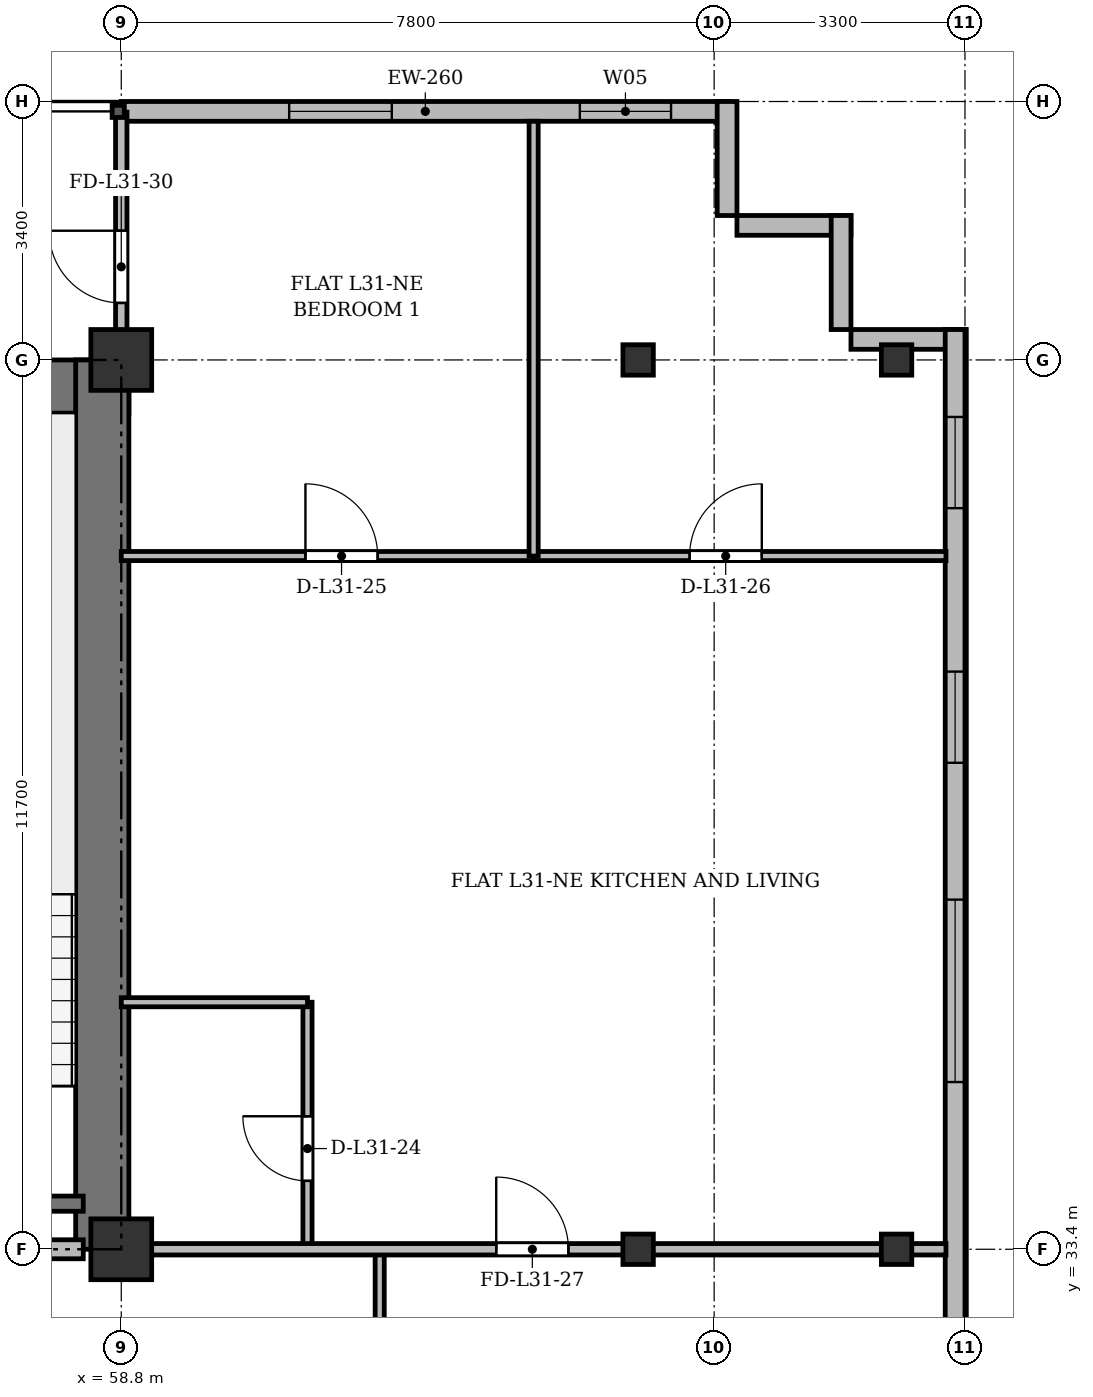
"""IFC4 building model, lengths in metres.
Left out: names, types, materials, properties, quantities, classifications, styles, units other than length and angle.
Written with IfcOpenShell. Run it as: python <this file> out.ifc"""

import sys

from ifc_helpers import new_model, si_unit, direction, frame, frame_2d, origin, origin_2d, place, context, subcontext, project, spatial, rectangle, i_section, extrude, source, transform, mapped, element, fill, save


model = new_model("IFC4")
c1 = context("Model", 3, precision=1e-05, world=origin(), true_north=direction((0.0, 1.0)))
c2 = subcontext(c1, "Body", "Model", "MODEL_VIEW")
j1 = project(units=[si_unit("LENGTHUNIT", "METRE"), si_unit("PLANEANGLEUNIT", "RADIAN")], contexts=[c1])
p1 = place(None, origin())
s1 = spatial("IfcSite", under=j1, at=p1, CompositionType="ELEMENT")
p2 = place(p1, origin())
s2 = spatial("IfcBuilding", under=s1, at=p2, CompositionType="ELEMENT")
p3 = place(p2, frame((0.0, 0.0, 121.3)))
s3 = spatial("IfcBuildingStorey", under=s2, at=p3, CompositionType="ELEMENT", Elevation=121.3)
m1 = source(origin(), c2, "Body", "SweptSolid", [
    extrude(rectangle(XDim=0.8, YDim=0.8, at=origin_2d()), origin(), (0.0, 0.0, 1.0), 3.6),
])
for number, where, z_axis, x_axis in (
    (1, (58.8, 33.4, 0.0), (0.0, 0.0, 1.0), (1.0, 0.0, 0.0)),
    (2, (58.8, 45.1, 0.0), (0.0, 0.0, 1.0), (1.0, 0.0, 0.0)),
):
    element("IfcColumn", number, at=place(p3, frame(where, z_axis=z_axis, x_axis=x_axis)), inside=s3, PredefinedType="COLUMN", context=c2, shape_type="MappedRepresentation", body=[
        mapped(m1, transform((0.0, 0.0, 0.0), x_axis=(1.0, 0.0, 0.0), y_axis=(0.0, 1.0, 0.0), z_axis=(0.0, 0.0, 1.0), scale=1.0)),
    ])
m2 = source(origin(), c2, "Body", "SweptSolid", [
    extrude(i_section(OverallWidth=0.4, OverallDepth=0.4, WebThickness=0.022, FlangeThickness=0.035, at=origin_2d()), origin(), (0.0, 0.0, 1.0), 3.6),
])
for number, where, z_axis, x_axis in (
    (3, (65.6, 33.4, 0.0), (0.0, 0.0, 1.0), (1.0, 0.0, 0.0)),
    (4, (65.6, 45.1, 0.0), (0.0, 0.0, 1.0), (1.0, 0.0, 0.0)),
    (5, (69.0, 33.4, 0.0), (0.0, 0.0, 1.0), (1.0, 0.0, 0.0)),
    (6, (69.0, 45.1, 0.0), (0.0, 0.0, 1.0), (1.0, 0.0, 0.0)),
):
    element("IfcColumn", number, at=place(p3, frame(where, z_axis=z_axis, x_axis=x_axis)), inside=s3, PredefinedType="COLUMN", context=c2, shape_type="MappedRepresentation", body=[
        mapped(m2, transform((0.0, 0.0, 0.0), x_axis=(1.0, 0.0, 0.0), y_axis=(0.0, 1.0, 0.0), z_axis=(0.0, 0.0, 1.0), scale=1.0)),
    ])
p4 = place(p3, frame((58.8, 48.37, 0.0), z_axis=(0.0, 0.0, 1.0), x_axis=(1.0, 0.0, 0.0)))
e7 = element("IfcWall", 7, at=p4, inside=s3, PredefinedType="SOLIDWALL", context=c2, shape_type="SweptSolid", body=[
    extrude(rectangle(XDim=8.0, YDim=0.26, at=frame_2d((4.0, 0.0))), origin(), (0.0, 0.0, 1.0), 3.34),
])
p5 = place(p4, frame((2.209, 0.0, 0.9)))
e8 = element("IfcOpeningElement", 8, at=p5, cuts=e7, PredefinedType="OPENING", context=c2, shape_type="SweptSolid", body=[
    extrude(rectangle(XDim=1.35, YDim=1.5, at=frame_2d((0.675, 0.75))), frame((0.0, 0.14, 0.0), z_axis=(0.0, -1.0, 0.0), x_axis=(1.0, 0.0, 0.0)), (0.0, 0.0, 1.0), 0.28),
])
p6 = place(p4, frame((6.033, 0.0, 0.9)))
e9 = element("IfcOpeningElement", 9, at=p6, cuts=e7, PredefinedType="OPENING", context=c2, shape_type="SweptSolid", body=[
    extrude(rectangle(XDim=1.2, YDim=1.65, at=frame_2d((0.6, 0.825))), frame((0.0, 0.14, 0.0), z_axis=(0.0, -1.0, 0.0), x_axis=(1.0, 0.0, 0.0)), (0.0, 0.0, 1.0), 0.28),
])
for number, where, z_axis, x_axis in (
    (10, (66.77, 48.5, 0.0), (0.0, 0.0, 1.0), (0.0, -1.0, 0.0)),
    (11, (66.9, 46.87, 0.0), (0.0, 0.0, 1.0), (1.0, 0.0, 0.0)),
    (12, (68.27, 47.0, 0.0), (0.0, 0.0, 1.0), (0.0, -1.0, 0.0)),
):
    element("IfcWall", number, at=place(p3, frame(where, z_axis=z_axis, x_axis=x_axis)), inside=s3, PredefinedType="SOLIDWALL", context=c2, shape_type="SweptSolid", body=[
        extrude(rectangle(XDim=1.5, YDim=0.26, at=frame_2d((0.75, 0.0))), origin(), (0.0, 0.0, 1.0), 3.34),
    ])
p7 = place(p3, frame((68.4, 45.37, 0.0), z_axis=(0.0, 0.0, 1.0), x_axis=(1.0, 0.0, 0.0)))
e13 = element("IfcWall", 13, at=p7, inside=s3, PredefinedType="SOLIDWALL", context=c2, shape_type="SweptSolid", body=[
    extrude(rectangle(XDim=1.5, YDim=0.26, at=frame_2d((0.75, 0.0))), origin(), (0.0, 0.0, 1.0), 2.752),
])
p8 = place(p3, frame((69.77, 45.5, 0.0), z_axis=(0.0, 0.0, 1.0), x_axis=(0.0, -1.0, 0.0)))
e14 = element("IfcWall", 14, at=p8, inside=s3, PredefinedType="SOLIDWALL", context=c2, shape_type="SweptSolid", body=[
    extrude(rectangle(XDim=39.6, YDim=0.26, at=frame_2d((19.8, 0.0))), origin(), (0.0, 0.0, 1.0), 3.34),
])
p9 = place(p8, frame((36.95, 0.0, 0.92)))
e15 = element("IfcOpeningElement", 15, at=p9, cuts=e14, PredefinedType="OPENING", context=c2, shape_type="SweptSolid", body=[
    extrude(rectangle(XDim=1.2, YDim=1.65, at=frame_2d((0.6, 0.825))), frame((0.0, 0.14, 0.0), z_axis=(0.0, -1.0, 0.0), x_axis=(1.0, 0.0, 0.0)), (0.0, 0.0, 1.0), 0.28),
])
p10 = place(p8, frame((32.9, 0.0, 0.92)))
e16 = element("IfcOpeningElement", 16, at=p10, cuts=e14, PredefinedType="OPENING", context=c2, shape_type="SweptSolid", body=[
    extrude(rectangle(XDim=2.4, YDim=2.1, at=frame_2d((1.2, 1.05))), frame((0.0, 0.14, 0.0), z_axis=(0.0, -1.0, 0.0), x_axis=(1.0, 0.0, 0.0)), (0.0, 0.0, 1.0), 0.28),
])
p11 = place(p8, frame((28.7, 0.0, 0.92)))
e17 = element("IfcOpeningElement", 17, at=p11, cuts=e14, PredefinedType="OPENING", context=c2, shape_type="SweptSolid", body=[
    extrude(rectangle(XDim=2.4, YDim=2.1, at=frame_2d((1.2, 1.05))), frame((0.0, 0.14, 0.0), z_axis=(0.0, -1.0, 0.0), x_axis=(1.0, 0.0, 0.0)), (0.0, 0.0, 1.0), 0.28),
])
p12 = place(p8, frame((21.5, 0.0, 0.92)))
e18 = element("IfcOpeningElement", 18, at=p12, cuts=e14, PredefinedType="OPENING", context=c2, shape_type="SweptSolid", body=[
    extrude(rectangle(XDim=2.4, YDim=2.1, at=frame_2d((1.2, 1.05))), frame((0.0, 0.14, 0.0), z_axis=(0.0, -1.0, 0.0), x_axis=(1.0, 0.0, 0.0)), (0.0, 0.0, 1.0), 0.28),
])
p13 = place(p8, frame((7.5, 0.0, 0.92)))
e19 = element("IfcOpeningElement", 19, at=p13, cuts=e14, PredefinedType="OPENING", context=c2, shape_type="SweptSolid", body=[
    extrude(rectangle(XDim=2.4, YDim=2.1, at=frame_2d((1.2, 1.05))), frame((0.0, 0.14, 0.0), z_axis=(0.0, -1.0, 0.0), x_axis=(1.0, 0.0, 0.0)), (0.0, 0.0, 1.0), 0.28),
])
p14 = place(p8, frame((4.5, 0.0, 0.92)))
e20 = element("IfcOpeningElement", 20, at=p14, cuts=e14, PredefinedType="OPENING", context=c2, shape_type="SweptSolid", body=[
    extrude(rectangle(XDim=1.2, YDim=1.65, at=frame_2d((0.6, 0.825))), frame((0.0, 0.14, 0.0), z_axis=(0.0, -1.0, 0.0), x_axis=(1.0, 0.0, 0.0)), (0.0, 0.0, 1.0), 0.28),
])
p15 = place(p8, frame((1.15, 0.0, 0.92)))
e21 = element("IfcOpeningElement", 21, at=p15, cuts=e14, PredefinedType="OPENING", context=c2, shape_type="SweptSolid", body=[
    extrude(rectangle(XDim=1.2, YDim=1.65, at=frame_2d((0.6, 0.825))), frame((0.0, 0.14, 0.0), z_axis=(0.0, -1.0, 0.0), x_axis=(1.0, 0.0, 0.0)), (0.0, 0.0, 1.0), 0.28),
])
p16 = place(p3, frame((15.5, 44.75, 0.0), z_axis=(0.0, 0.0, 1.0), x_axis=(1.0, 0.0, 0.0)))
e22 = element("IfcWall", 22, at=p16, inside=s3, PredefinedType="SHEAR", context=c2, shape_type="SweptSolid", body=[
    extrude(rectangle(XDim=43.4, YDim=0.7, at=frame_2d((21.7, 0.0))), origin(), (0.0, 0.0, 1.0), 3.34),
])
p17 = place(p3, frame((58.55, 33.4, 0.0), z_axis=(0.0, 0.0, 1.0), x_axis=(0.0, 1.0, 0.0)))
e23 = element("IfcWall", 23, at=p17, inside=s3, PredefinedType="SHEAR", context=c2, shape_type="SweptSolid", body=[
    extrude(rectangle(XDim=11.7, YDim=0.7, at=frame_2d((5.85, 0.0))), origin(), (0.0, 0.0, 1.0), 3.34),
])
p18 = place(p3, frame((54.9, 34.0, 0.0), z_axis=(0.0, 0.0, 1.0), x_axis=(1.0, 0.0, 0.0)))
e24 = element("IfcWall", 24, at=p18, inside=s3, PredefinedType="SHEAR", context=c2, shape_type="SweptSolid", body=[
    extrude(rectangle(XDim=3.4, YDim=0.2, at=frame_2d((1.7, 0.0))), origin(), (0.0, 0.0, 1.0), 3.34),
])
p19 = place(p3, frame((47.15, 33.4, 0.0), z_axis=(0.0, 0.0, 1.0), x_axis=(1.0, 0.0, 0.0)))
e25 = element("IfcWall", 25, at=p19, inside=s3, PredefinedType="PARTITIONING", context=c2, shape_type="SweptSolid", body=[
    extrude(rectangle(XDim=11.15, YDim=0.25, at=frame_2d((5.575, 0.0))), origin(), (0.0, 0.0, 1.0), 2.752),
])
p20 = place(p19, frame((0.7, 0.0, 0.0)))
e26 = element("IfcOpeningElement", 26, at=p20, cuts=e25, PredefinedType="OPENING", context=c2, shape_type="SweptSolid", body=[
    extrude(rectangle(XDim=0.95, YDim=2.15, at=frame_2d((0.475, 1.075))), frame((0.0, 0.135, 0.0), z_axis=(0.0, -1.0, 0.0), x_axis=(1.0, 0.0, 0.0)), (0.0, 0.0, 1.0), 0.27),
])
p21 = place(p19, frame((6.0, 0.0, 0.0)))
e27 = element("IfcOpeningElement", 27, at=p21, cuts=e25, PredefinedType="OPENING", context=c2, shape_type="SweptSolid", body=[
    extrude(rectangle(XDim=1.2, YDim=2.15, at=frame_2d((0.6, 1.075))), frame((0.0, 0.135, 0.0), z_axis=(0.0, -1.0, 0.0), x_axis=(1.0, 0.0, 0.0)), (0.0, 0.0, 1.0), 0.27),
])
p22 = place(p3, frame((62.2, 29.8, 0.0), z_axis=(0.0, 0.0, 1.0), x_axis=(0.0, 1.0, 0.0)))
e28 = element("IfcWall", 28, at=p22, inside=s3, PredefinedType="PARTITIONING", context=c2, shape_type="SweptSolid", body=[
    extrude(rectangle(XDim=3.6, YDim=0.12, at=frame_2d((1.8, 0.0))), origin(), (0.0, 0.0, 1.0), 2.752),
])
p23 = place(p3, frame((61.25, 33.4, 0.0), z_axis=(0.0, 0.0, 1.0), x_axis=(0.0, 1.0, 0.0)))
e29 = element("IfcWall", 29, at=p23, inside=s3, PredefinedType="PARTITIONING", context=c2, shape_type="SweptSolid", body=[
    extrude(rectangle(XDim=3.25, YDim=0.12, at=frame_2d((1.625, 0.0))), origin(), (0.0, 0.0, 1.0), 2.752),
])
p24 = place(p23, frame((0.9, 0.0, 0.0)))
e30 = element("IfcOpeningElement", 30, at=p24, cuts=e29, PredefinedType="OPENING", context=c2, shape_type="SweptSolid", body=[
    extrude(rectangle(XDim=0.85, YDim=2.1, at=frame_2d((0.425, 1.05))), frame((0.0, 0.07, 0.0), z_axis=(0.0, -1.0, 0.0), x_axis=(1.0, 0.0, 0.0)), (0.0, 0.0, 1.0), 0.14),
])
p25 = place(p3, frame((58.8, 36.65, 0.0), z_axis=(0.0, 0.0, 1.0), x_axis=(1.0, 0.0, 0.0)))
e31 = element("IfcWall", 31, at=p25, inside=s3, PredefinedType="PARTITIONING", context=c2, shape_type="SweptSolid", body=[
    extrude(rectangle(XDim=2.45, YDim=0.12, at=frame_2d((1.225, 0.0))), origin(), (0.0, 0.0, 1.0), 2.84),
])
p26 = place(p3, frame((58.8, 42.52, 0.0), z_axis=(0.0, 0.0, 1.0), x_axis=(1.0, 0.0, 0.0)))
e32 = element("IfcWall", 32, at=p26, inside=s3, PredefinedType="PARTITIONING", context=c2, shape_type="SweptSolid", body=[
    extrude(rectangle(XDim=5.425, YDim=0.12, at=frame_2d((2.712, 0.0))), origin(), (0.0, 0.0, 1.0), 2.84),
])
p27 = place(p26, frame((2.423, 0.0, 0.0)))
e33 = element("IfcOpeningElement", 33, at=p27, cuts=e32, PredefinedType="OPENING", context=c2, shape_type="SweptSolid", body=[
    extrude(rectangle(XDim=0.95, YDim=2.15, at=frame_2d((0.475, 1.075))), frame((0.0, 0.07, 0.0), z_axis=(0.0, -1.0, 0.0), x_axis=(1.0, 0.0, 0.0)), (0.0, 0.0, 1.0), 0.14),
])
p28 = place(p3, frame((64.225, 42.52, 0.0), z_axis=(0.0, 0.0, 1.0), x_axis=(1.0, 0.0, 0.0)))
e34 = element("IfcWall", 34, at=p28, inside=s3, PredefinedType="PARTITIONING", context=c2, shape_type="SweptSolid", body=[
    extrude(rectangle(XDim=5.425, YDim=0.12, at=frame_2d((2.712, 0.0))), origin(), (0.0, 0.0, 1.0), 2.84),
])
p29 = place(p28, frame((2.052, 0.0, 0.0)))
e35 = element("IfcOpeningElement", 35, at=p29, cuts=e34, PredefinedType="OPENING", context=c2, shape_type="SweptSolid", body=[
    extrude(rectangle(XDim=0.95, YDim=2.15, at=frame_2d((0.475, 1.075))), frame((0.0, 0.07, 0.0), z_axis=(0.0, -1.0, 0.0), x_axis=(1.0, 0.0, 0.0)), (0.0, 0.0, 1.0), 0.14),
])
p30 = place(p3, frame((64.225, 42.52, 0.0), z_axis=(0.0, 0.0, 1.0), x_axis=(0.0, 1.0, 0.0)))
e36 = element("IfcWall", 36, at=p30, inside=s3, PredefinedType="PARTITIONING", context=c2, shape_type="SweptSolid", body=[
    extrude(rectangle(XDim=5.72, YDim=0.12, at=frame_2d((2.86, 0.0))), origin(), (0.0, 0.0, 1.0), 2.752),
])
p31 = place(p3, frame((58.8, 33.4, 0.0), z_axis=(0.0, 0.0, 1.0), x_axis=(1.0, 0.0, 0.0)))
e37 = element("IfcWall", 37, at=p31, inside=s3, PredefinedType="PARTITIONING", context=c2, shape_type="SweptSolid", body=[
    extrude(rectangle(XDim=10.85, YDim=0.15, at=frame_2d((5.425, 0.0))), origin(), (0.0, 0.0, 1.0), 2.752),
])
p32 = place(p31, frame((4.933, 0.0, 0.0)))
e38 = element("IfcOpeningElement", 38, at=p32, cuts=e37, PredefinedType="OPENING", context=c2, shape_type="SweptSolid", body=[
    extrude(rectangle(XDim=0.95, YDim=2.15, at=frame_2d((0.475, 1.075))), frame((0.0, 0.085, 0.0), z_axis=(0.0, -1.0, 0.0), x_axis=(1.0, 0.0, 0.0)), (0.0, 0.0, 1.0), 0.17),
])
p33 = place(p3, frame((58.8, 44.75, 0.0), z_axis=(0.0, 0.0, 1.0), x_axis=(0.0, 1.0, 0.0)))
e39 = element("IfcWall", 39, at=p33, inside=s3, PredefinedType="PARTITIONING", context=c2, shape_type="SweptSolid", body=[
    extrude(rectangle(XDim=3.61, YDim=0.15, at=frame_2d((1.805, 0.0))), origin(), (0.0, 0.0, 1.0), 2.84),
])
p34 = place(p33, frame((1.1, 0.0, 0.0)))
e40 = element("IfcOpeningElement", 40, at=p34, cuts=e39, PredefinedType="OPENING", context=c2, shape_type="SweptSolid", body=[
    extrude(rectangle(XDim=0.95, YDim=2.15, at=frame_2d((0.475, 1.075))), frame((0.0, 0.085, 0.0), z_axis=(0.0, -1.0, 0.0), x_axis=(1.0, 0.0, 0.0)), (0.0, 0.0, 1.0), 0.17),
])
m3 = source(origin(), c2, "Body", "SweptSolid", [
    extrude(rectangle(XDim=1.35, YDim=1.5, at=frame_2d((0.675, 0.75))), frame((0.0, 0.03, 0.0), z_axis=(0.0, -1.0, 0.0), x_axis=(1.0, 0.0, 0.0)), (0.0, 0.0, 1.0), 0.06),
])
p35 = place(p5, origin())
e41 = element("IfcWindow", 41, at=p35, inside=s3, PartitioningType="SINGLE_PANEL", PredefinedType="WINDOW", context=c2, shape_type="MappedRepresentation", body=[
    mapped(m3, transform((0.0, 0.0, 0.0), x_axis=(1.0, 0.0, 0.0), y_axis=(0.0, 1.0, 0.0), z_axis=(0.0, 0.0, 1.0), scale=1.0)),
])
fill(e8, e41)
m4 = source(origin(), c2, "Body", "SweptSolid", [
    extrude(rectangle(XDim=1.2, YDim=1.65, at=frame_2d((0.6, 0.825))), frame((0.0, 0.03, 0.0), z_axis=(0.0, -1.0, 0.0), x_axis=(1.0, 0.0, 0.0)), (0.0, 0.0, 1.0), 0.06),
])
p36 = place(p6, origin())
e42 = element("IfcWindow", 42, at=p36, inside=s3, PartitioningType="SINGLE_PANEL", PredefinedType="WINDOW", context=c2, shape_type="MappedRepresentation", body=[
    mapped(m4, transform((0.0, 0.0, 0.0), x_axis=(1.0, 0.0, 0.0), y_axis=(0.0, 1.0, 0.0), z_axis=(0.0, 0.0, 1.0), scale=1.0)),
])
fill(e9, e42)
m5 = source(origin(), c2, "Body", "SweptSolid", [
    extrude(rectangle(XDim=2.4, YDim=2.1, at=frame_2d((1.2, 1.05))), frame((0.0, 0.03, 0.0), z_axis=(0.0, -1.0, 0.0), x_axis=(1.0, 0.0, 0.0)), (0.0, 0.0, 1.0), 0.06),
])
p37 = place(p13, origin())
e43 = element("IfcWindow", 43, at=p37, inside=s3, PartitioningType="SINGLE_PANEL", PredefinedType="WINDOW", context=c2, shape_type="MappedRepresentation", body=[
    mapped(m5, transform((0.0, 0.0, 0.0), x_axis=(1.0, 0.0, 0.0), y_axis=(0.0, 1.0, 0.0), z_axis=(0.0, 0.0, 1.0), scale=1.0)),
])
fill(e19, e43)
p38 = place(p14, origin())
e44 = element("IfcWindow", 44, at=p38, inside=s3, PartitioningType="SINGLE_PANEL", PredefinedType="WINDOW", context=c2, shape_type="MappedRepresentation", body=[
    mapped(m4, transform((0.0, 0.0, 0.0), x_axis=(1.0, 0.0, 0.0), y_axis=(0.0, 1.0, 0.0), z_axis=(0.0, 0.0, 1.0), scale=1.0)),
])
fill(e20, e44)
p39 = place(p15, origin())
e45 = element("IfcWindow", 45, at=p39, inside=s3, PartitioningType="SINGLE_PANEL", PredefinedType="WINDOW", context=c2, shape_type="MappedRepresentation", body=[
    mapped(m4, transform((0.0, 0.0, 0.0), x_axis=(1.0, 0.0, 0.0), y_axis=(0.0, 1.0, 0.0), z_axis=(0.0, 0.0, 1.0), scale=1.0)),
])
fill(e21, e45)
m6 = source(origin(), c2, "Body", "SweptSolid", [
    extrude(rectangle(XDim=0.85, YDim=2.1, at=frame_2d((0.425, 1.05))), frame((0.0, 0.025, 0.0), z_axis=(0.0, -1.0, 0.0), x_axis=(1.0, 0.0, 0.0)), (0.0, 0.0, 1.0), 0.05),
])
p40 = place(p24, origin())
e46 = element("IfcDoor", 46, at=p40, inside=s3, OperationType="SINGLE_SWING_RIGHT", PredefinedType="DOOR", context=c2, shape_type="MappedRepresentation", body=[
    mapped(m6, transform((0.0, 0.0, 0.0), x_axis=(1.0, 0.0, 0.0), y_axis=(0.0, 1.0, 0.0), z_axis=(0.0, 0.0, 1.0), scale=1.0)),
])
fill(e30, e46)
m7 = source(origin(), c2, "Body", "SweptSolid", [
    extrude(rectangle(XDim=0.95, YDim=2.15, at=frame_2d((0.475, 1.075))), frame((0.0, 0.025, 0.0), z_axis=(0.0, -1.0, 0.0), x_axis=(1.0, 0.0, 0.0)), (0.0, 0.0, 1.0), 0.05),
])
p41 = place(p27, origin())
e47 = element("IfcDoor", 47, at=p41, inside=s3, OperationType="SINGLE_SWING_LEFT", PredefinedType="DOOR", context=c2, shape_type="MappedRepresentation", body=[
    mapped(m7, transform((0.0, 0.0, 0.0), x_axis=(1.0, 0.0, 0.0), y_axis=(0.0, 1.0, 0.0), z_axis=(0.0, 0.0, 1.0), scale=1.0)),
])
fill(e33, e47)
p42 = place(p29, origin())
e48 = element("IfcDoor", 48, at=p42, inside=s3, OperationType="SINGLE_SWING_RIGHT", PredefinedType="DOOR", context=c2, shape_type="MappedRepresentation", body=[
    mapped(m7, transform((0.0, 0.0, 0.0), x_axis=(1.0, 0.0, 0.0), y_axis=(0.0, 1.0, 0.0), z_axis=(0.0, 0.0, 1.0), scale=1.0)),
])
fill(e35, e48)
p43 = place(p32, origin())
e49 = element("IfcDoor", 49, at=p43, inside=s3, OperationType="SINGLE_SWING_LEFT", PredefinedType="DOOR", context=c2, shape_type="MappedRepresentation", body=[
    mapped(m7, transform((0.0, 0.0, 0.0), x_axis=(1.0, 0.0, 0.0), y_axis=(0.0, 1.0, 0.0), z_axis=(0.0, 0.0, 1.0), scale=1.0)),
])
fill(e38, e49)
p44 = place(p34, origin())
e50 = element("IfcDoor", 50, at=p44, inside=s3, OperationType="SINGLE_SWING_RIGHT", PredefinedType="DOOR", context=c2, shape_type="MappedRepresentation", body=[
    mapped(m7, transform((0.0, 0.0, 0.0), x_axis=(1.0, 0.0, 0.0), y_axis=(0.0, 1.0, 0.0), z_axis=(0.0, 0.0, 1.0), scale=1.0)),
])
fill(e40, e50)
save(model, sys.argv[1])
